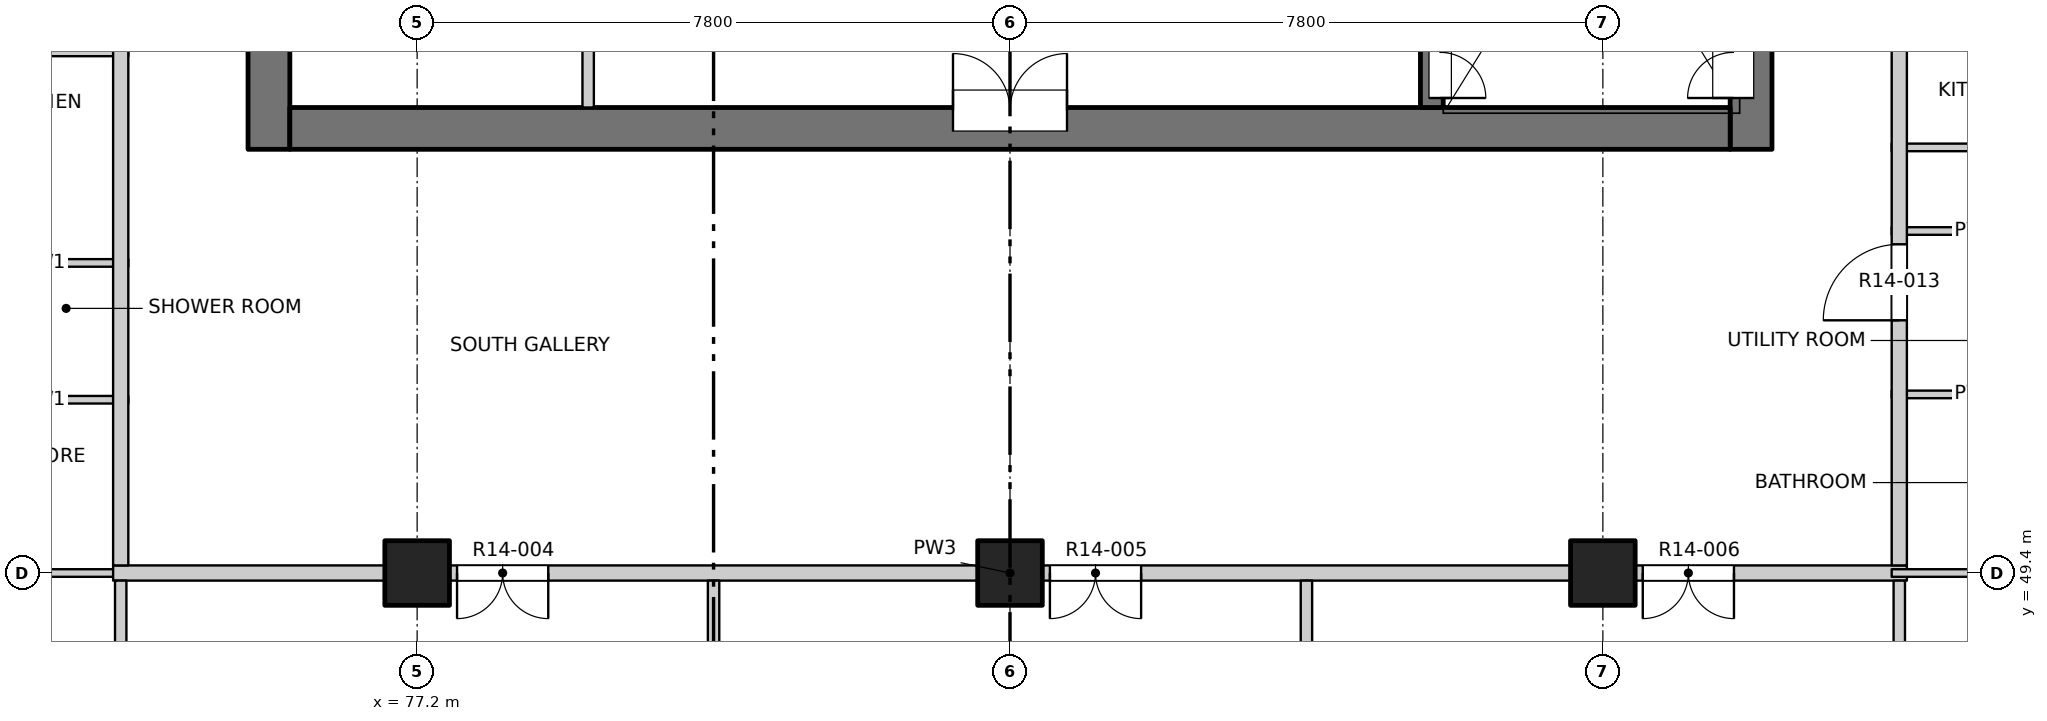
"""IFC4 building model, lengths in metres.
Left out: names, types, materials, properties, quantities, classifications, styles, units other than length and angle.
Written with IfcOpenShell. Run it as: python <this file> out.ifc"""

import sys

from ifc_helpers import new_model, si_unit, direction, frame, frame_2d, origin, origin_2d, place, context, subcontext, project, spatial, rectangle, extrude, element, fill, save


model = new_model("IFC4")
c1 = context("Model", 3, precision=1e-05, world=origin(), true_north=direction((0.0, 1.0)))
c2 = subcontext(c1, "Body", "Model", "MODEL_VIEW")
j1 = project(units=[si_unit("LENGTHUNIT", "METRE"), si_unit("PLANEANGLEUNIT", "RADIAN")], contexts=[c1])
p1 = place(None, origin())
s1 = spatial("IfcSite", under=j1, at=p1, CompositionType="ELEMENT")
p2 = place(p1, origin())
s2 = spatial("IfcBuilding", under=s1, at=p2, CompositionType="ELEMENT")
p3 = place(p2, frame((0.0, 0.0, 148.6)))
s3 = spatial("IfcBuildingStorey", under=s2, at=p3, CompositionType="ELEMENT", Elevation=148.6)
for number, where, z_axis, x_axis in (
    (1, (77.2, 49.4, -0.3), (0.0, 0.0, 1.0), (1.0, 0.0, 0.0)),
    (2, (85.0, 49.4, -0.3), (0.0, 0.0, 1.0), (1.0, 0.0, 0.0)),
    (3, (92.8, 49.4, -0.3), (0.0, 0.0, 1.0), (1.0, 0.0, 0.0)),
):
    element("IfcColumn", number, at=place(p3, frame(where, z_axis=z_axis, x_axis=x_axis)), inside=s3, PredefinedType="COLUMN", context=c2, shape_type="SweptSolid", body=[
        extrude(rectangle(XDim=0.85, YDim=0.85, at=origin_2d()), origin(), (0.0, 0.0, 1.0), 3.45),
    ])
p4 = place(p3, frame((75.25, 54.975, -0.3), z_axis=(0.0, 0.0, 1.0), x_axis=(0.0, 1.0, 0.0)))
e4 = element("IfcWall", 4, at=p4, inside=s3, PredefinedType="SOLIDWALL", context=c2, shape_type="SweptSolid", body=[
    extrude(rectangle(XDim=22.325, YDim=0.55, at=frame_2d((11.163, 0.0))), origin(), (0.0, 0.0, 1.0), 3.45),
])
p5 = place(p4, frame((7.475, 0.0, 0.3)))
e5 = element("IfcOpeningElement", 5, at=p5, cuts=e4, PredefinedType="OPENING", context=c2, shape_type="SweptSolid", body=[
    extrude(rectangle(XDim=0.9, YDim=2.1, at=frame_2d((0.45, 1.05))), frame((0.0, 0.285, 0.0), z_axis=(0.0, -1.0, 0.0), x_axis=(1.0, 0.0, 0.0)), (0.0, 0.0, 1.0), 0.57),
])
p6 = place(p4, frame((13.775, 0.0, 0.3)))
e6 = element("IfcOpeningElement", 6, at=p6, cuts=e4, PredefinedType="OPENING", context=c2, shape_type="SweptSolid", body=[
    extrude(rectangle(XDim=0.9, YDim=2.1, at=frame_2d((0.45, 1.05))), frame((0.0, 0.285, 0.0), z_axis=(0.0, -1.0, 0.0), x_axis=(1.0, 0.0, 0.0)), (0.0, 0.0, 1.0), 0.57),
])
p7 = place(p4, frame((20.075, 0.0, 0.3)))
e7 = element("IfcOpeningElement", 7, at=p7, cuts=e4, PredefinedType="OPENING", context=c2, shape_type="SweptSolid", body=[
    extrude(rectangle(XDim=0.9, YDim=2.1, at=frame_2d((0.45, 1.05))), frame((0.0, 0.285, 0.0), z_axis=(0.0, -1.0, 0.0), x_axis=(1.0, 0.0, 0.0)), (0.0, 0.0, 1.0), 0.57),
])
p8 = place(p3, frame((94.75, 54.975, -0.3), z_axis=(0.0, 0.0, 1.0), x_axis=(0.0, 1.0, 0.0)))
e8 = element("IfcWall", 8, at=p8, inside=s3, PredefinedType="SOLIDWALL", context=c2, shape_type="SweptSolid", body=[
    extrude(rectangle(XDim=6.975, YDim=0.55, at=frame_2d((3.487, 0.0))), origin(), (0.0, 0.0, 1.0), 3.45),
])
p9 = place(p8, frame((0.675, 0.0, 0.3)))
e9 = element("IfcOpeningElement", 9, at=p9, cuts=e8, PredefinedType="OPENING", context=c2, shape_type="SweptSolid", body=[
    extrude(rectangle(XDim=1.2, YDim=2.1, at=frame_2d((0.6, 1.05))), frame((0.0, 0.285, 0.0), z_axis=(0.0, -1.0, 0.0), x_axis=(1.0, 0.0, 0.0)), (0.0, 0.0, 1.0), 0.57),
])
p10 = place(p3, frame((75.525, 55.25, -0.3), z_axis=(0.0, 0.0, 1.0), x_axis=(1.0, 0.0, 0.0)))
e10 = element("IfcWall", 10, at=p10, inside=s3, PredefinedType="SOLIDWALL", context=c2, shape_type="SweptSolid", body=[
    extrude(rectangle(XDim=18.95, YDim=0.55, at=frame_2d((9.475, 0.0))), origin(), (0.0, 0.0, 1.0), 3.45),
])
p11 = place(p10, frame((8.725, 0.0, 0.3)))
e11 = element("IfcOpeningElement", 11, at=p11, cuts=e10, PredefinedType="OPENING", context=c2, shape_type="SweptSolid", body=[
    extrude(rectangle(XDim=1.5, YDim=2.1, at=frame_2d((0.75, 1.05))), frame((0.0, 0.285, 0.0), z_axis=(0.0, -1.0, 0.0), x_axis=(1.0, 0.0, 0.0)), (0.0, 0.0, 1.0), 0.57),
])
p12 = place(p3, frame((90.55, 55.525, -0.3), z_axis=(0.0, 0.0, 1.0), x_axis=(0.0, 1.0, 0.0)))
e12 = element("IfcWall", 12, at=p12, inside=s3, PredefinedType="SOLIDWALL", context=c2, shape_type="SweptSolid", body=[
    extrude(rectangle(XDim=6.425, YDim=0.3, at=frame_2d((3.212, 0.0))), origin(), (0.0, 0.0, 1.0), 3.45),
])
p13 = place(p12, frame((0.125, 0.0, 0.3)))
e13 = element("IfcOpeningElement", 13, at=p13, cuts=e12, PredefinedType="OPENING", context=c2, shape_type="SweptSolid", body=[
    extrude(rectangle(XDim=1.2, YDim=2.1, at=frame_2d((0.6, 1.05))), frame((0.0, 0.16, 0.0), z_axis=(0.0, -1.0, 0.0), x_axis=(1.0, 0.0, 0.0)), (0.0, 0.0, 1.0), 0.32),
])
p14 = place(p3, frame((65.8, 49.4, 0.0), z_axis=(0.0, 0.0, 1.0), x_axis=(1.0, 0.0, 0.0)))
e14 = element("IfcWall", 14, at=p14, inside=s3, PredefinedType="PARTITIONING", context=c2, shape_type="SweptSolid", body=[
    extrude(rectangle(XDim=7.6, YDim=0.1, at=frame_2d((3.8, 0.0))), origin(), (0.0, 0.0, 1.0), 3.15),
])
p15 = place(p14, frame((4.14, 0.0, 0.0)))
e15 = element("IfcOpeningElement", 15, at=p15, cuts=e14, PredefinedType="OPENING", context=c2, shape_type="SweptSolid", body=[
    extrude(rectangle(XDim=0.9, YDim=2.1, at=frame_2d((0.45, 1.05))), frame((0.0, 0.06, 0.0), z_axis=(0.0, -1.0, 0.0), x_axis=(1.0, 0.0, 0.0)), (0.0, 0.0, 1.0), 0.12),
])
p16 = place(p3, frame((73.2, 49.4, 0.0), z_axis=(0.0, 0.0, 1.0), x_axis=(1.0, 0.0, 0.0)))
e16 = element("IfcWall", 16, at=p16, inside=s3, PredefinedType="PARTITIONING", context=c2, shape_type="SweptSolid", body=[
    extrude(rectangle(XDim=23.6, YDim=0.2, at=frame_2d((11.8, 0.0))), origin(), (0.0, 0.0, 1.0), 3.15),
])
p17 = place(p16, frame((4.525, 0.0, 0.0)))
e17 = element("IfcOpeningElement", 17, at=p17, cuts=e16, PredefinedType="OPENING", context=c2, shape_type="SweptSolid", body=[
    extrude(rectangle(XDim=1.2, YDim=2.1, at=frame_2d((0.6, 1.05))), frame((0.0, 0.11, 0.0), z_axis=(0.0, -1.0, 0.0), x_axis=(1.0, 0.0, 0.0)), (0.0, 0.0, 1.0), 0.22),
])
p18 = place(p16, frame((12.325, 0.0, 0.0)))
e18 = element("IfcOpeningElement", 18, at=p18, cuts=e16, PredefinedType="OPENING", context=c2, shape_type="SweptSolid", body=[
    extrude(rectangle(XDim=1.2, YDim=2.1, at=frame_2d((0.6, 1.05))), frame((0.0, 0.11, 0.0), z_axis=(0.0, -1.0, 0.0), x_axis=(1.0, 0.0, 0.0)), (0.0, 0.0, 1.0), 0.22),
])
p19 = place(p16, frame((20.125, 0.0, 0.0)))
e19 = element("IfcOpeningElement", 19, at=p19, cuts=e16, PredefinedType="OPENING", context=c2, shape_type="SweptSolid", body=[
    extrude(rectangle(XDim=1.2, YDim=2.1, at=frame_2d((0.6, 1.05))), frame((0.0, 0.11, 0.0), z_axis=(0.0, -1.0, 0.0), x_axis=(1.0, 0.0, 0.0)), (0.0, 0.0, 1.0), 0.22),
])
p20 = place(p3, frame((96.6, 49.4, 0.0), z_axis=(0.0, 0.0, 1.0), x_axis=(1.0, 0.0, 0.0)))
e20 = element("IfcWall", 20, at=p20, inside=s3, PredefinedType="PARTITIONING", context=c2, shape_type="SweptSolid", body=[
    extrude(rectangle(XDim=7.6, YDim=0.1, at=frame_2d((3.8, 0.0))), origin(), (0.0, 0.0, 1.0), 3.15),
])
p21 = place(p20, frame((2.56, 0.0, 0.0)))
e21 = element("IfcOpeningElement", 21, at=p21, cuts=e20, PredefinedType="OPENING", context=c2, shape_type="SweptSolid", body=[
    extrude(rectangle(XDim=0.9, YDim=2.1, at=frame_2d((0.45, 1.05))), frame((0.0, 0.06, 0.0), z_axis=(0.0, -1.0, 0.0), x_axis=(1.0, 0.0, 0.0)), (0.0, 0.0, 1.0), 0.12),
])
for number, where, z_axis, x_axis in (
    (22, (71.18, 51.68, 0.0), (0.0, 0.0, 1.0), (1.0, 0.0, 0.0)),
    (23, (96.6, 51.75, 0.0), (0.0, 0.0, 1.0), (1.0, 0.0, 0.0)),
    (24, (71.18, 53.48, 0.0), (0.0, 0.0, 1.0), (1.0, 0.0, 0.0)),
    (25, (96.6, 53.9, 0.0), (0.0, 0.0, 1.0), (1.0, 0.0, 0.0)),
    (26, (96.6, 55.0, 0.0), (0.0, 0.0, 1.0), (1.0, 0.0, 0.0)),
    (27, (71.18, 56.25, 0.0), (0.0, 0.0, 1.0), (1.0, 0.0, 0.0)),
):
    element("IfcWall", number, at=place(p3, frame(where, z_axis=z_axis, x_axis=x_axis)), inside=s3, PredefinedType="PARTITIONING", context=c2, shape_type="SweptSolid", body=[
        extrude(rectangle(XDim=2.22, YDim=0.1, at=frame_2d((1.11, 0.0))), origin(), (0.0, 0.0, 1.0), 3.15),
    ])
p22 = place(p3, frame((73.3, 45.8, 0.0), z_axis=(0.0, 0.0, 1.0), x_axis=(0.0, 1.0, 0.0)))
e28 = element("IfcWall", 28, at=p22, inside=s3, PredefinedType="PARTITIONING", context=c2, shape_type="SweptSolid", body=[
    extrude(rectangle(XDim=3.5, YDim=0.15, at=frame_2d((1.75, 0.0))), origin(), (0.0, 0.0, 1.0), 3.15),
])
p23 = place(p3, frame((73.3, 49.5, 0.0), z_axis=(0.0, 0.0, 1.0), x_axis=(0.0, 1.0, 0.0)))
e29 = element("IfcWall", 29, at=p23, inside=s3, PredefinedType="PARTITIONING", context=c2, shape_type="SweptSolid", body=[
    extrude(rectangle(XDim=34.7, YDim=0.2, at=frame_2d((17.35, 0.0))), origin(), (0.0, 0.0, 1.0), 3.15),
])
p24 = place(p23, frame((10.125, 0.0, 0.0)))
e30 = element("IfcOpeningElement", 30, at=p24, cuts=e29, PredefinedType="OPENING", context=c2, shape_type="SweptSolid", body=[
    extrude(rectangle(XDim=1.0, YDim=2.1, at=frame_2d((0.5, 1.05))), frame((0.0, 0.11, 0.0), z_axis=(0.0, -1.0, 0.0), x_axis=(1.0, 0.0, 0.0)), (0.0, 0.0, 1.0), 0.22),
])
p25 = place(p23, frame((14.575, 0.0, 0.0)))
e31 = element("IfcOpeningElement", 31, at=p25, cuts=e29, PredefinedType="OPENING", context=c2, shape_type="SweptSolid", body=[
    extrude(rectangle(XDim=1.0, YDim=2.1, at=frame_2d((0.5, 1.05))), frame((0.0, 0.11, 0.0), z_axis=(0.0, -1.0, 0.0), x_axis=(1.0, 0.0, 0.0)), (0.0, 0.0, 1.0), 0.22),
])
p26 = place(p23, frame((26.575, 0.0, 0.0)))
e32 = element("IfcOpeningElement", 32, at=p26, cuts=e29, PredefinedType="OPENING", context=c2, shape_type="SweptSolid", body=[
    extrude(rectangle(XDim=1.0, YDim=2.1, at=frame_2d((0.5, 1.05))), frame((0.0, 0.11, 0.0), z_axis=(0.0, -1.0, 0.0), x_axis=(1.0, 0.0, 0.0)), (0.0, 0.0, 1.0), 0.22),
])
p27 = place(p3, frame((79.45, 55.525, 0.0), z_axis=(0.0, 0.0, 1.0), x_axis=(0.0, 1.0, 0.0)))
e33 = element("IfcWall", 33, at=p27, inside=s3, PredefinedType="PARTITIONING", context=c2, shape_type="SweptSolid", body=[
    extrude(rectangle(XDim=5.375, YDim=0.15, at=frame_2d((2.688, 0.0))), origin(), (0.0, 0.0, 1.0), 3.15),
])
p28 = place(p27, frame((2.175, 0.0, 0.0)))
e34 = element("IfcOpeningElement", 34, at=p28, cuts=e33, PredefinedType="OPENING", context=c2, shape_type="SweptSolid", body=[
    extrude(rectangle(XDim=0.9, YDim=2.1, at=frame_2d((0.45, 1.05))), frame((0.0, 0.085, 0.0), z_axis=(0.0, -1.0, 0.0), x_axis=(1.0, 0.0, 0.0)), (0.0, 0.0, 1.0), 0.17),
])
for number, where, z_axis, x_axis in (
    (35, (81.1, 45.8, 0.0), (0.0, 0.0, 1.0), (0.0, 1.0, 0.0)),
    (36, (88.9, 45.8, 0.0), (0.0, 0.0, 1.0), (0.0, 1.0, 0.0)),
    (37, (96.7, 45.8, 0.0), (0.0, 0.0, 1.0), (0.0, 1.0, 0.0)),
):
    element("IfcWall", number, at=place(p3, frame(where, z_axis=z_axis, x_axis=x_axis)), inside=s3, PredefinedType="PARTITIONING", context=c2, shape_type="SweptSolid", body=[
        extrude(rectangle(XDim=3.5, YDim=0.15, at=frame_2d((1.75, 0.0))), origin(), (0.0, 0.0, 1.0), 3.15),
    ])
p29 = place(p3, frame((96.7, 49.5, 0.0), z_axis=(0.0, 0.0, 1.0), x_axis=(0.0, 1.0, 0.0)))
e38 = element("IfcWall", 38, at=p29, inside=s3, PredefinedType="PARTITIONING", context=c2, shape_type="SweptSolid", body=[
    extrude(rectangle(XDim=34.7, YDim=0.2, at=frame_2d((17.35, 0.0))), origin(), (0.0, 0.0, 1.0), 3.15),
])
p30 = place(p29, frame((3.225, 0.0, 0.0)))
e39 = element("IfcOpeningElement", 39, at=p30, cuts=e38, PredefinedType="OPENING", context=c2, shape_type="SweptSolid", body=[
    extrude(rectangle(XDim=1.0, YDim=2.1, at=frame_2d((0.5, 1.05))), frame((0.0, 0.11, 0.0), z_axis=(0.0, -1.0, 0.0), x_axis=(1.0, 0.0, 0.0)), (0.0, 0.0, 1.0), 0.22),
])
p31 = place(p29, frame((19.775, 0.0, 0.0)))
e40 = element("IfcOpeningElement", 40, at=p31, cuts=e38, PredefinedType="OPENING", context=c2, shape_type="SweptSolid", body=[
    extrude(rectangle(XDim=1.0, YDim=2.1, at=frame_2d((0.5, 1.05))), frame((0.0, 0.11, 0.0), z_axis=(0.0, -1.0, 0.0), x_axis=(1.0, 0.0, 0.0)), (0.0, 0.0, 1.0), 0.22),
])
p32 = place(p29, frame((24.125, 0.0, 0.0)))
e41 = element("IfcOpeningElement", 41, at=p32, cuts=e38, PredefinedType="OPENING", context=c2, shape_type="SweptSolid", body=[
    extrude(rectangle(XDim=1.0, YDim=2.1, at=frame_2d((0.5, 1.05))), frame((0.0, 0.11, 0.0), z_axis=(0.0, -1.0, 0.0), x_axis=(1.0, 0.0, 0.0)), (0.0, 0.0, 1.0), 0.22),
])
p33 = place(p17, origin())
e42 = element("IfcDoor", 42, at=p33, inside=s3, OperationType="DOUBLE_DOOR_SINGLE_SWING", PredefinedType="DOOR", context=c2, shape_type="SweptSolid", body=[
    extrude(rectangle(XDim=1.2, YDim=2.1, at=frame_2d((0.6, 1.05))), frame((0.0, 0.025, 0.0), z_axis=(0.0, -1.0, 0.0), x_axis=(1.0, 0.0, 0.0)), (0.0, 0.0, 1.0), 0.05),
])
fill(e17, e42)
p34 = place(p18, origin())
e43 = element("IfcDoor", 43, at=p34, inside=s3, OperationType="DOUBLE_DOOR_SINGLE_SWING", PredefinedType="DOOR", context=c2, shape_type="SweptSolid", body=[
    extrude(rectangle(XDim=1.2, YDim=2.1, at=frame_2d((0.6, 1.05))), frame((0.0, 0.025, 0.0), z_axis=(0.0, -1.0, 0.0), x_axis=(1.0, 0.0, 0.0)), (0.0, 0.0, 1.0), 0.05),
])
fill(e18, e43)
p35 = place(p19, origin())
e44 = element("IfcDoor", 44, at=p35, inside=s3, OperationType="DOUBLE_DOOR_SINGLE_SWING", PredefinedType="DOOR", context=c2, shape_type="SweptSolid", body=[
    extrude(rectangle(XDim=1.2, YDim=2.1, at=frame_2d((0.6, 1.05))), frame((0.0, 0.025, 0.0), z_axis=(0.0, -1.0, 0.0), x_axis=(1.0, 0.0, 0.0)), (0.0, 0.0, 1.0), 0.05),
])
fill(e19, e44)
p36 = place(p30, origin())
e45 = element("IfcDoor", 45, at=p36, inside=s3, OperationType="SINGLE_SWING_RIGHT", PredefinedType="DOOR", context=c2, shape_type="SweptSolid", body=[
    extrude(rectangle(XDim=1.0, YDim=2.1, at=frame_2d((0.5, 1.05))), frame((0.0, 0.025, 0.0), z_axis=(0.0, -1.0, 0.0), x_axis=(1.0, 0.0, 0.0)), (0.0, 0.0, 1.0), 0.05),
])
fill(e39, e45)
p37 = place(p11, origin())
e46 = element("IfcDoor", 46, at=p37, inside=s3, OperationType="DOUBLE_DOOR_SINGLE_SWING", PredefinedType="DOOR", context=c2, shape_type="SweptSolid", body=[
    extrude(rectangle(XDim=1.5, YDim=2.1, at=frame_2d((0.75, 1.05))), frame((0.0, 0.26, 0.0), z_axis=(0.0, -1.0, 0.0), x_axis=(1.0, 0.0, 0.0)), (0.0, 0.0, 1.0), 0.05),
])
fill(e11, e46)
p38 = place(p13, origin())
e47 = element("IfcDoor", 47, at=p38, inside=s3, OperationType="DOUBLE_DOOR_SINGLE_SWING", PredefinedType="DOOR", context=c2, shape_type="SweptSolid", body=[
    extrude(rectangle(XDim=1.2, YDim=2.1, at=frame_2d((0.6, 1.05))), frame((0.0, -0.085, 0.0), z_axis=(0.0, -1.0, 0.0), x_axis=(1.0, 0.0, 0.0)), (0.0, 0.0, 1.0), 0.05),
])
fill(e13, e47)
p39 = place(p9, origin())
e48 = element("IfcDoor", 48, at=p39, inside=s3, OperationType="DOUBLE_DOOR_SINGLE_SWING", PredefinedType="DOOR", context=c2, shape_type="SweptSolid", body=[
    extrude(rectangle(XDim=1.2, YDim=2.1, at=frame_2d((0.6, 1.05))), frame((0.0, 0.26, 0.0), z_axis=(0.0, -1.0, 0.0), x_axis=(1.0, 0.0, 0.0)), (0.0, 0.0, 1.0), 0.05),
])
fill(e9, e48)
save(model, sys.argv[1])
